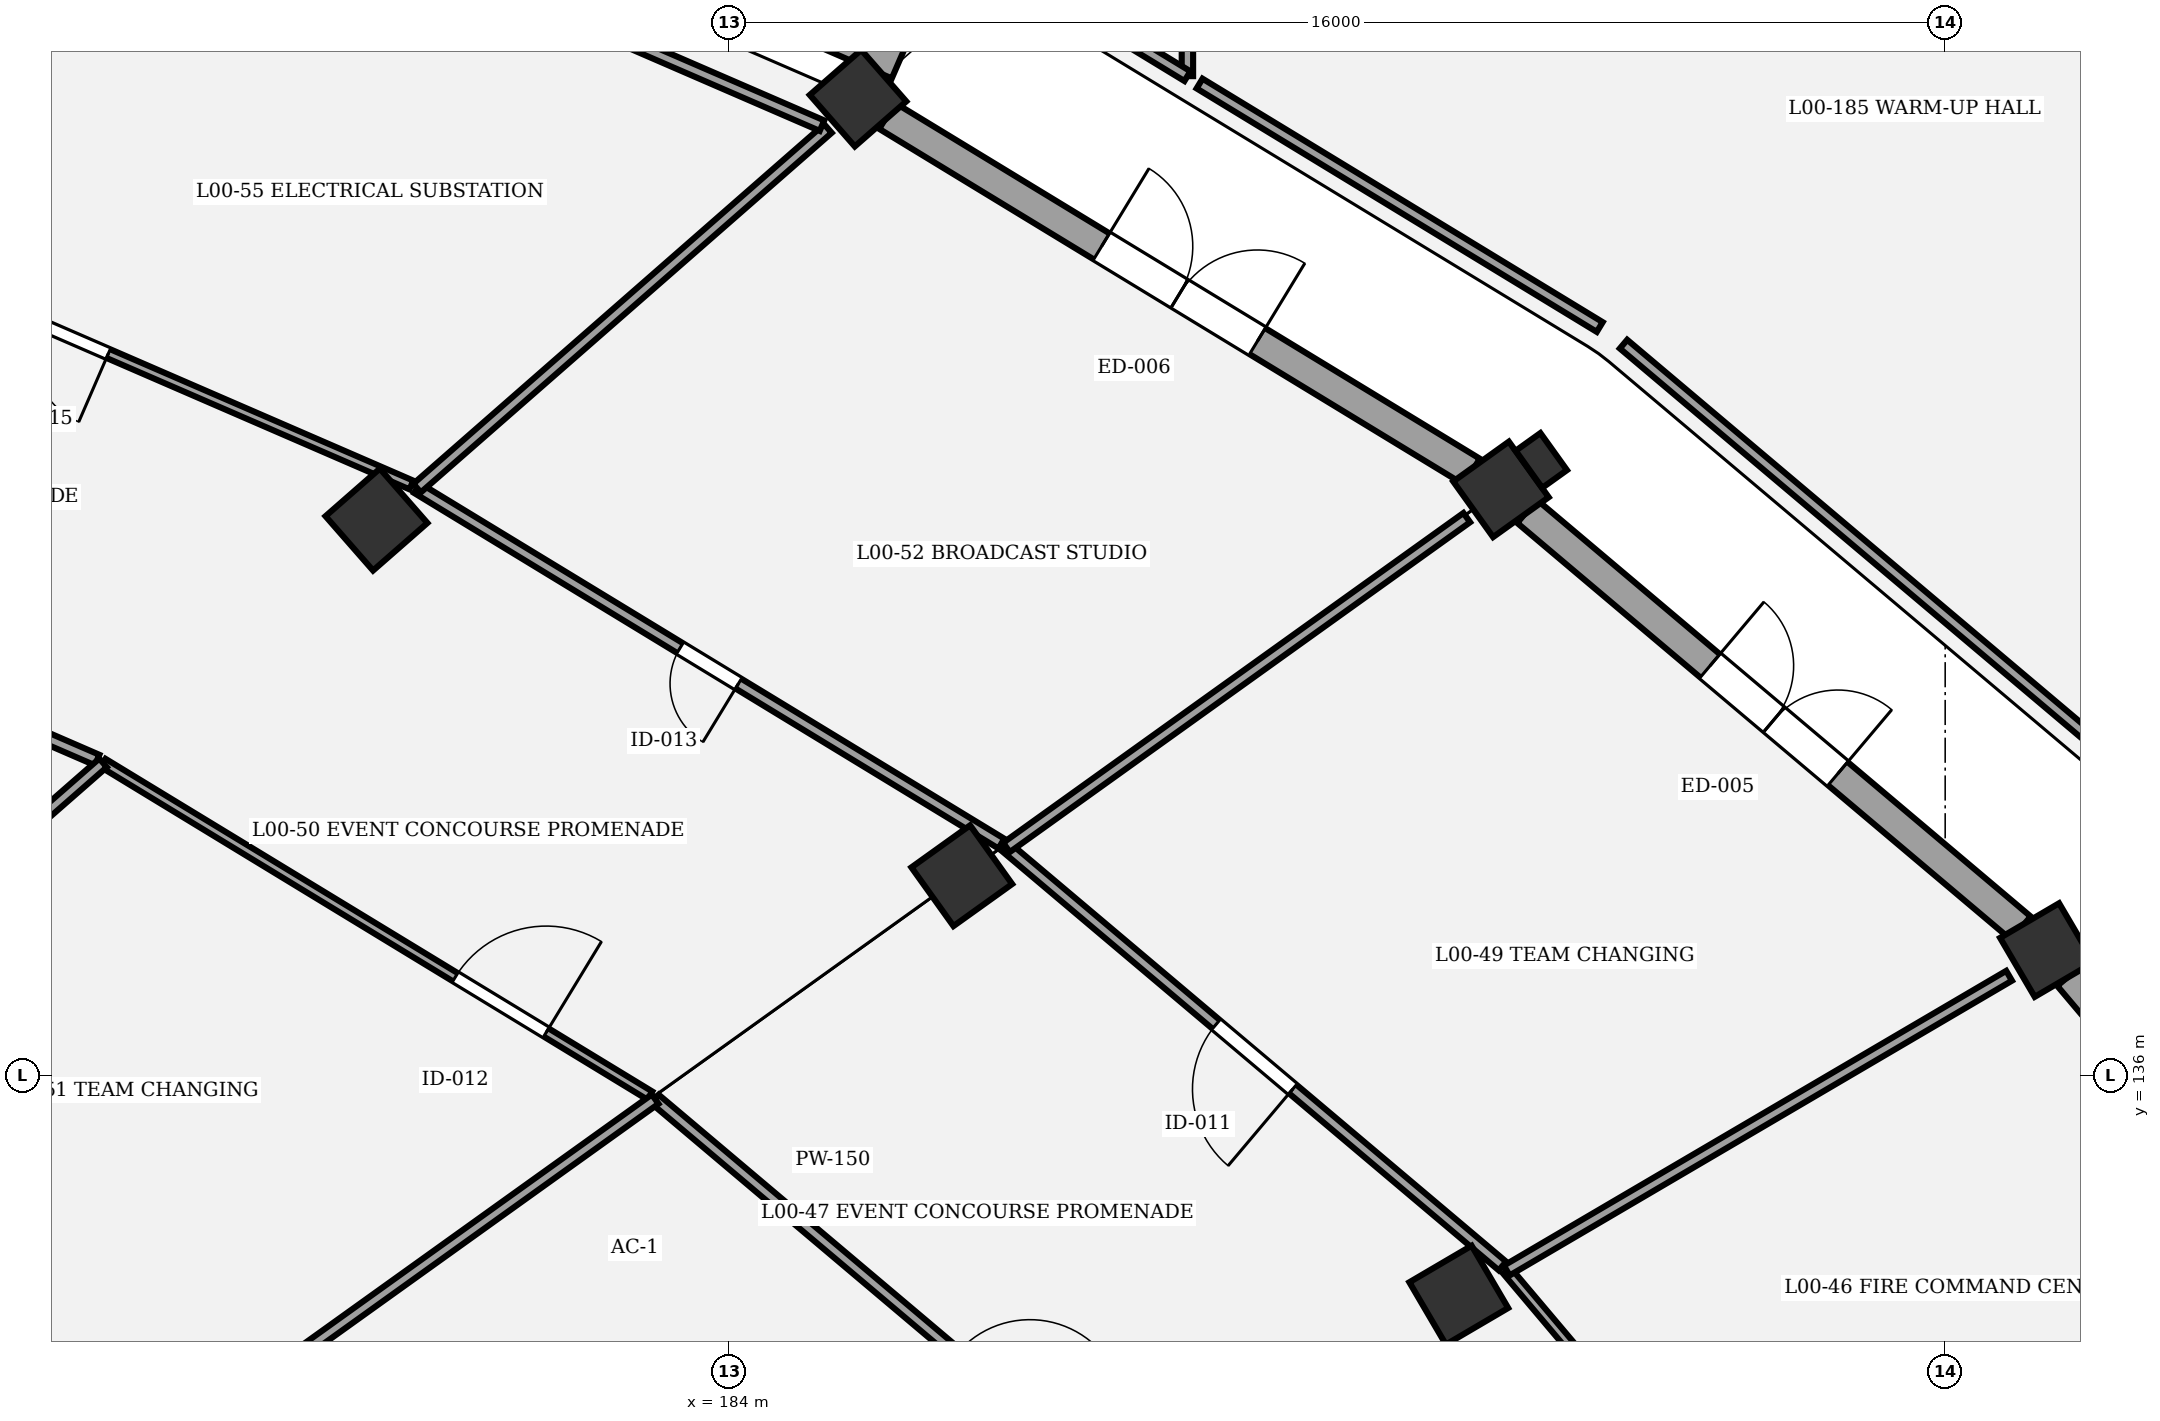
"""IFC4 building model, lengths in metres.
Left out: names, types, materials, properties, quantities, classifications, styles, units other than length and angle.
Written with IfcOpenShell. Run it as: python <this file> out.ifc"""

import sys

from ifc_helpers import new_model, si_unit, direction, frame, frame_2d, origin, origin_2d, place, context, subcontext, project, spatial, rectangle, extrude, element, fill, save


model = new_model("IFC4")
c1 = context("Model", 3, precision=1e-05, world=origin(), true_north=direction((0.0, 1.0)))
c2 = subcontext(c1, "Body", "Model", "MODEL_VIEW")
j1 = project(units=[si_unit("LENGTHUNIT", "METRE"), si_unit("PLANEANGLEUNIT", "RADIAN")], contexts=[c1])
p1 = place(None, origin())
s1 = spatial("IfcSite", under=j1, at=p1, CompositionType="ELEMENT")
p2 = place(p1, origin())
s2 = spatial("IfcBuilding", under=s1, at=p2, CompositionType="ELEMENT")
p3 = place(p2, origin())
s3 = spatial("IfcBuildingStorey", under=s2, at=p3, CompositionType="ELEMENT", Elevation=0.0)
p4 = place(p3, frame((193.6, 133.114, 0.0), z_axis=(0.0, 0.0, 1.0), x_axis=(0.862513669207, 0.506033764121, 0.0)))
e1 = element("IfcColumn", 1, at=p4, inside=s3, PredefinedType="COLUMN", context=c2, shape_type="SweptSolid", body=[
    extrude(rectangle(XDim=0.95, YDim=0.95, at=origin_2d()), origin(), (0.0, 0.0, 1.0), 5.4),
])
p5 = place(p3, frame((201.338, 137.654, 0.0), z_axis=(0.0, 0.0, 1.0), x_axis=(0.862513669207, 0.506033764121, 0.0)))
e2 = element("IfcColumn", 2, at=p5, inside=s3, PredefinedType="COLUMN", context=c2, shape_type="SweptSolid", body=[
    extrude(rectangle(XDim=0.9, YDim=0.9, at=origin_2d()), origin(), (0.0, 0.0, 1.0), 5.4),
])
p6 = place(p3, frame((187.061, 138.632, 0.0), z_axis=(0.0, 0.0, 1.0), x_axis=(0.812897512265, 0.582406760395, 0.0)))
e3 = element("IfcColumn", 3, at=p6, inside=s3, PredefinedType="COLUMN", context=c2, shape_type="SweptSolid", body=[
    extrude(rectangle(XDim=0.95, YDim=0.95, at=origin_2d()), origin(), (0.0, 0.0, 1.0), 5.4),
])
p7 = place(p3, frame((194.156, 143.715, 0.0), z_axis=(0.0, 0.0, 1.0), x_axis=(0.812897512265, 0.582406760395, 0.0)))
e4 = element("IfcColumn", 4, at=p7, inside=s3, PredefinedType="COLUMN", context=c2, shape_type="SweptSolid", body=[
    extrude(rectangle(XDim=0.9, YDim=0.9, at=origin_2d()), origin(), (0.0, 0.0, 1.0), 5.4),
])
p8 = place(p3, frame((194.686, 144.095, 0.0), z_axis=(0.0, 0.0, 1.0), x_axis=(-0.582406760395, 0.812897512265, 0.0)))
e5 = element("IfcColumn", 5, at=p8, inside=s3, PredefinedType="PILASTER", context=c2, shape_type="SweptSolid", body=[
    extrude(rectangle(XDim=0.6, YDim=0.4, at=origin_2d()), origin(), (0.0, 0.0, 1.0), 5.4),
])
p9 = place(p3, frame((179.36, 143.317, 0.0), z_axis=(0.0, 0.0, 1.0), x_axis=(0.752529860433, 0.658558128912, 0.0)))
e6 = element("IfcColumn", 6, at=p9, inside=s3, PredefinedType="COLUMN", context=c2, shape_type="SweptSolid", body=[
    extrude(rectangle(XDim=0.95, YDim=0.95, at=origin_2d()), origin(), (0.0, 0.0, 1.0), 5.4),
])
p10 = place(p3, frame((185.696, 148.861, 0.0), z_axis=(0.0, 0.0, 1.0), x_axis=(0.752529860433, 0.658558128912, 0.0)))
e7 = element("IfcColumn", 7, at=p10, inside=s3, PredefinedType="COLUMN", context=c2, shape_type="SweptSolid", body=[
    extrude(rectangle(XDim=0.9, YDim=0.9, at=origin_2d()), origin(), (0.0, 0.0, 1.0), 5.4),
])
p11 = place(p3, frame((186.23, 149.328, 0.0), z_axis=(0.0, 0.0, 1.0), x_axis=(-0.917502700529, 0.397729549471, 0.0)))
e8 = element("IfcWall", 8, at=p11, inside=s3, PredefinedType="USERDEFINED", context=c2, shape_type="SweptSolid", body=[
    extrude(rectangle(XDim=10.716, YDim=0.45, at=frame_2d((5.358, 0.0))), origin(), (0.0, 0.0, 1.0), 4.25),
])
p12 = place(p3, frame((201.627, 137.311, 0.0), z_axis=(0.0, 0.0, 1.0), x_axis=(0.645194244502, -0.764018577563, 0.0)))
e9 = element("IfcWall", 9, at=p12, inside=s3, PredefinedType="STANDARD", context=c2, shape_type="SweptSolid", body=[
    extrude(rectangle(XDim=8.256, YDim=0.4, at=frame_2d((4.128, 0.0))), origin(), (0.0, 0.0, 1.0), 4.25),
])
p13 = place(p12, frame((3.078, 0.0, 0.0)))
e10 = element("IfcOpeningElement", 10, at=p13, cuts=e9, PredefinedType="OPENING", context=c2, shape_type="SweptSolid", body=[
    extrude(rectangle(XDim=2.1, YDim=2.45, at=frame_2d((1.05, 1.225))), frame((0.0, 0.21, 0.0), z_axis=(0.0, -1.0, 0.0), x_axis=(1.0, 0.0, 0.0)), (0.0, 0.0, 1.0), 0.42),
])
p14 = place(p3, frame((194.498, 143.426, 0.0), z_axis=(0.0, 0.0, 1.0), x_axis=(0.764254773348, -0.644914445035, 0.0)))
e11 = element("IfcWall", 11, at=p14, inside=s3, PredefinedType="STANDARD", context=c2, shape_type="SweptSolid", body=[
    extrude(rectangle(XDim=8.502, YDim=0.4, at=frame_2d((4.251, 0.0))), origin(), (0.0, 0.0, 1.0), 4.25),
])
p15 = place(p14, frame((3.151, 0.0, 0.0)))
e12 = element("IfcOpeningElement", 12, at=p15, cuts=e11, PredefinedType="OPENING", context=c2, shape_type="SweptSolid", body=[
    extrude(rectangle(XDim=2.2, YDim=2.5, at=frame_2d((1.1, 1.25))), frame((0.0, 0.21, 0.0), z_axis=(0.0, -1.0, 0.0), x_axis=(1.0, 0.0, 0.0)), (0.0, 0.0, 1.0), 0.42),
])
p16 = place(p3, frame((186.079, 148.628, 0.0), z_axis=(0.0, 0.0, 1.0), x_axis=(0.854319454423, -0.519748275413, 0.0)))
e13 = element("IfcWall", 13, at=p16, inside=s3, PredefinedType="STANDARD", context=c2, shape_type="SweptSolid", body=[
    extrude(rectangle(XDim=9.006, YDim=0.4, at=frame_2d((4.503, 0.0))), origin(), (0.0, 0.0, 1.0), 4.25),
])
p17 = place(p16, frame((3.303, 0.0, 0.0)))
e14 = element("IfcOpeningElement", 14, at=p17, cuts=e13, PredefinedType="OPENING", context=c2, shape_type="SweptSolid", body=[
    extrude(rectangle(XDim=2.4, YDim=2.55, at=frame_2d((1.2, 1.275))), frame((0.0, 0.21, 0.0), z_axis=(0.0, -1.0, 0.0), x_axis=(1.0, 0.0, 0.0)), (0.0, 0.0, 1.0), 0.42),
])
p18 = place(p3, frame((199.595, 127.086, 0.0), z_axis=(0.0, 0.0, 1.0), x_axis=(-0.64516519871, 0.76404310505, 0.0)))
e15 = element("IfcWall", 15, at=p18, inside=s3, PredefinedType="PARTITIONING", context=c2, shape_type="SweptSolid", body=[
    extrude(rectangle(XDim=8.313, YDim=0.125, at=frame_2d((4.157, 0.0))), origin(), (0.0, 0.0, 1.0), 4.15),
])
p19 = place(p18, frame((3.547, 0.0, 0.0)))
e16 = element("IfcOpeningElement", 16, at=p19, cuts=e15, PredefinedType="OPENING", context=c2, shape_type="SweptSolid", body=[
    extrude(rectangle(XDim=1.22, YDim=2.1, at=frame_2d((0.61, 1.05))), frame((0.0, 0.073, 0.0), z_axis=(0.0, -1.0, 0.0), x_axis=(1.0, 0.0, 0.0)), (0.0, 0.0, 1.0), 0.145),
])
p20 = place(p3, frame((183.027, 135.692, 0.0), z_axis=(0.0, 0.0, 1.0), x_axis=(0.764249122867, -0.644921141068, 0.0)))
e17 = element("IfcWall", 17, at=p20, inside=s3, PredefinedType="PARTITIONING", context=c2, shape_type="SweptSolid", body=[
    extrude(rectangle(XDim=7.99, YDim=0.15, at=frame_2d((3.995, 0.0))), origin(), (0.0, 0.0, 1.0), 4.15),
])
p21 = place(p20, frame((5.192, 0.0, 0.0)))
e18 = element("IfcOpeningElement", 18, at=p21, cuts=e17, PredefinedType="OPENING", context=c2, shape_type="SweptSolid", body=[
    extrude(rectangle(XDim=1.26, YDim=2.1, at=frame_2d((0.63, 1.05))), frame((0.0, 0.085, 0.0), z_axis=(0.0, -1.0, 0.0), x_axis=(1.0, 0.0, 0.0)), (0.0, 0.0, 1.0), 0.17),
])
p22 = place(p3, frame((194.175, 133.497, 0.0), z_axis=(0.0, 0.0, 1.0), x_axis=(-0.764257572309, 0.644911128117, 0.0)))
e19 = element("IfcWall", 19, at=p22, inside=s3, PredefinedType="PARTITIONING", context=c2, shape_type="SweptSolid", body=[
    extrude(rectangle(XDim=8.539, YDim=0.15, at=frame_2d((4.269, 0.0))), origin(), (0.0, 0.0, 1.0), 4.15),
])
p23 = place(p22, frame((3.609, 0.0, 0.0)))
e20 = element("IfcOpeningElement", 20, at=p23, cuts=e19, PredefinedType="OPENING", context=c2, shape_type="SweptSolid", body=[
    extrude(rectangle(XDim=1.32, YDim=2.1, at=frame_2d((0.66, 1.05))), frame((0.0, 0.085, 0.0), z_axis=(0.0, -1.0, 0.0), x_axis=(1.0, 0.0, 0.0)), (0.0, 0.0, 1.0), 0.17),
])
p24 = place(p3, frame((175.763, 140.116, 0.0), z_axis=(0.0, 0.0, 1.0), x_axis=(0.854330104408, -0.519730769439, 0.0)))
e21 = element("IfcWall", 21, at=p24, inside=s3, PredefinedType="PARTITIONING", context=c2, shape_type="SweptSolid", body=[
    extrude(rectangle(XDim=8.42, YDim=0.125, at=frame_2d((4.21, 0.0))), origin(), (0.0, 0.0, 1.0), 4.15),
])
p25 = place(p24, frame((5.424, 0.0, 0.0)))
e22 = element("IfcOpeningElement", 22, at=p25, cuts=e21, PredefinedType="OPENING", context=c2, shape_type="SweptSolid", body=[
    extrude(rectangle(XDim=1.4, YDim=2.1, at=frame_2d((0.7, 1.05))), frame((0.0, 0.073, 0.0), z_axis=(0.0, -1.0, 0.0), x_axis=(1.0, 0.0, 0.0)), (0.0, 0.0, 1.0), 0.145),
])
p26 = place(p3, frame((187.582, 139.054, 0.0), z_axis=(0.0, 0.0, 1.0), x_axis=(-0.854321649351, 0.519744667554, 0.0)))
e23 = element("IfcWall", 23, at=p26, inside=s3, PredefinedType="PARTITIONING", context=c2, shape_type="SweptSolid", body=[
    extrude(rectangle(XDim=8.999, YDim=0.15, at=frame_2d((4.499, 0.0))), origin(), (0.0, 0.0, 1.0), 4.15),
])
p27 = place(p26, frame((4.049, 0.0, 0.0)))
e24 = element("IfcOpeningElement", 24, at=p27, cuts=e23, PredefinedType="OPENING", context=c2, shape_type="SweptSolid", body=[
    extrude(rectangle(XDim=0.9, YDim=2.2, at=frame_2d((0.45, 1.1))), frame((0.0, 0.085, 0.0), z_axis=(0.0, -1.0, 0.0), x_axis=(1.0, 0.0, 0.0)), (0.0, 0.0, 1.0), 0.17),
])
p28 = place(p3, frame((167.382, 143.753, 0.0), z_axis=(0.0, 0.0, 1.0), x_axis=(0.917494590455, -0.397748257677, 0.0)))
e25 = element("IfcWall", 25, at=p28, inside=s3, PredefinedType="PARTITIONING", context=c2, shape_type="SweptSolid", body=[
    extrude(rectangle(XDim=9.049, YDim=0.15, at=frame_2d((4.525, 0.0))), origin(), (0.0, 0.0, 1.0), 4.15),
])
p29 = place(p28, frame((6.295, 0.0, 0.0)))
e26 = element("IfcOpeningElement", 26, at=p29, cuts=e25, PredefinedType="OPENING", context=c2, shape_type="SweptSolid", body=[
    extrude(rectangle(XDim=0.94, YDim=2.2, at=frame_2d((0.47, 1.1))), frame((0.0, 0.085, 0.0), z_axis=(0.0, -1.0, 0.0), x_axis=(1.0, 0.0, 0.0)), (0.0, 0.0, 1.0), 0.17),
])
p30 = place(p3, frame((179.82, 143.772, 0.0), z_axis=(0.0, 0.0, 1.0), x_axis=(-0.917508957037, 0.39771511633, 0.0)))
e27 = element("IfcWall", 27, at=p30, inside=s3, PredefinedType="PARTITIONING", context=c2, shape_type="SweptSolid", body=[
    extrude(rectangle(XDim=9.671, YDim=0.125, at=frame_2d((4.836, 0.0))), origin(), (0.0, 0.0, 1.0), 4.15),
])
p31 = place(p30, frame((4.346, 0.0, 0.0)))
e28 = element("IfcOpeningElement", 28, at=p31, cuts=e27, PredefinedType="OPENING", context=c2, shape_type="SweptSolid", body=[
    extrude(rectangle(XDim=0.98, YDim=2.2, at=frame_2d((0.49, 1.1))), frame((0.0, 0.073, 0.0), z_axis=(0.0, -1.0, 0.0), x_axis=(1.0, 0.0, 0.0)), (0.0, 0.0, 1.0), 0.145),
])
p32 = place(p3, frame((194.232, 133.438, 0.0), z_axis=(0.0, 0.0, 1.0), x_axis=(0.862520085009, 0.506022828492, 0.0)))
e29 = element("IfcWall", 29, at=p32, inside=s3, PredefinedType="PARTITIONING", context=c2, shape_type="SweptSolid", body=[
    extrude(rectangle(XDim=7.663, YDim=0.15, at=frame_2d((3.831, 0.0))), origin(), (0.0, 0.0, 1.0), 4.15),
])
p33 = place(p3, frame((170.698, 126.858, 0.0), z_axis=(0.0, 0.0, 1.0), x_axis=(0.812883175227, 0.582426770876, 0.0)))
e30 = element("IfcWall", 30, at=p33, inside=s3, PredefinedType="PARTITIONING", context=c2, shape_type="SweptSolid", body=[
    extrude(rectangle(XDim=15.167, YDim=0.15, at=frame_2d((7.583, 0.0))), origin(), (0.0, 0.0, 1.0), 4.15),
])
p34 = place(p3, frame((187.649, 139.004, 0.0), z_axis=(0.0, 0.0, 1.0), x_axis=(0.812884613266, 0.582424763824, 0.0)))
e31 = element("IfcWall", 31, at=p34, inside=s3, PredefinedType="PARTITIONING", context=c2, shape_type="SweptSolid", body=[
    extrude(rectangle(XDim=7.45, YDim=0.15, at=frame_2d((3.725, 0.0))), origin(), (0.0, 0.0, 1.0), 4.15),
])
p35 = place(p3, frame((164.755, 130.483, 0.0), z_axis=(0.0, 0.0, 1.0), x_axis=(0.75255911769, 0.658524695346, 0.0)))
e32 = element("IfcWall", 32, at=p35, inside=s3, PredefinedType="PARTITIONING", context=c2, shape_type="SweptSolid", body=[
    extrude(rectangle(XDim=14.627, YDim=0.15, at=frame_2d((7.314, 0.0))), origin(), (0.0, 0.0, 1.0), 4.15),
])
p36 = place(p3, frame((179.895, 143.731, 0.0), z_axis=(0.0, 0.0, 1.0), x_axis=(0.752564061831, 0.658519045162, 0.0)))
e33 = element("IfcWall", 33, at=p36, inside=s3, PredefinedType="PARTITIONING", context=c2, shape_type="SweptSolid", body=[
    extrude(rectangle(XDim=7.183, YDim=0.15, at=frame_2d((3.592, 0.0))), origin(), (0.0, 0.0, 1.0), 4.15),
])
p37 = place(p3, frame((172.286, 149.072, 0.0), z_axis=(0.0, 0.0, 1.0), x_axis=(0.67785928919, 0.735191664846, 0.0)))
e34 = element("IfcWall", 34, at=p37, inside=s3, PredefinedType="PARTITIONING", context=c2, shape_type="SweptSolid", body=[
    extrude(rectangle(XDim=4.893, YDim=0.15, at=frame_2d((2.446, 0.0))), origin(), (0.0, 0.0, 1.0), 4.15),
])
p38 = place(p3, frame((176.189, 152.415, 0.0), z_axis=(0.0, 0.0, 1.0), x_axis=(0.917505556499, -0.397722961109, 0.0)))
e35 = element("IfcWall", 35, at=p38, inside=s3, PredefinedType="PARTITIONING", context=c2, shape_type="SweptSolid", body=[
    extrude(rectangle(XDim=9.845, YDim=0.15, at=frame_2d((4.922, 0.0))), origin(), (0.0, 0.0, 1.0), 4.15),
])
p39 = place(p3, frame((190.03, 155.34, 0.0), z_axis=(0.0, 0.0, 1.0), x_axis=(0.0, -1.0, 0.0)))
e36 = element("IfcWall", 36, at=p39, inside=s3, PredefinedType="PARTITIONING", context=c2, shape_type="SweptSolid", body=[
    extrude(rectangle(XDim=6.189, YDim=0.15, at=frame_2d((3.095, 0.0))), origin(), (0.0, 0.0, 1.0), 4.15),
])
p40 = place(p3, frame((190.03, 149.151, 0.0), z_axis=(0.0, 0.0, 1.0), x_axis=(-0.854335242099, 0.519722324042, 0.0)))
e37 = element("IfcWall", 37, at=p40, inside=s3, PredefinedType="PARTITIONING", context=c2, shape_type="SweptSolid", body=[
    extrude(rectangle(XDim=3.552, YDim=0.15, at=frame_2d((1.776, 0.0))), origin(), (0.0, 0.0, 1.0), 4.15),
])
p41 = place(p3, frame((202.951, 139.564, 0.0), z_axis=(0.0, 0.0, 1.0), x_axis=(-0.76426547638, 0.644901761212, 0.0)))
e38 = element("IfcWall", 38, at=p41, inside=s3, PredefinedType="PARTITIONING", context=c2, shape_type="SweptSolid", body=[
    extrude(rectangle(XDim=9.398, YDim=0.15, at=frame_2d((4.699, 0.0))), origin(), (0.0, 0.0, 1.0), 4.15),
])
p42 = place(p3, frame((195.455, 145.85, 0.0), z_axis=(0.0, 0.0, 1.0), x_axis=(-0.854341575167, 0.519711913411, 0.0)))
e39 = element("IfcWall", 39, at=p42, inside=s3, PredefinedType="PARTITIONING", context=c2, shape_type="SweptSolid", body=[
    extrude(rectangle(XDim=6.163, YDim=0.15, at=frame_2d((3.082, 0.0))), origin(), (0.0, 0.0, 1.0), 4.15),
])
p43 = place(p15, origin())
e40 = element("IfcDoor", 40, at=p43, inside=s3, OperationType="DOUBLE_DOOR_SINGLE_SWING", PredefinedType="DOOR", context=c2, shape_type="SweptSolid", body=[
    extrude(rectangle(XDim=2.2, YDim=2.5, at=frame_2d((1.1, 1.25))), frame((0.0, 0.025, 0.0), z_axis=(0.0, -1.0, 0.0), x_axis=(1.0, 0.0, 0.0)), (0.0, 0.0, 1.0), 0.05),
])
fill(e12, e40)
p44 = place(p17, origin())
e41 = element("IfcDoor", 41, at=p44, inside=s3, OperationType="DOUBLE_DOOR_SINGLE_SWING", PredefinedType="DOOR", context=c2, shape_type="SweptSolid", body=[
    extrude(rectangle(XDim=2.4, YDim=2.55, at=frame_2d((1.2, 1.275))), frame((0.0, 0.025, 0.0), z_axis=(0.0, -1.0, 0.0), x_axis=(1.0, 0.0, 0.0)), (0.0, 0.0, 1.0), 0.05),
])
fill(e14, e41)
p45 = place(p23, origin())
e42 = element("IfcDoor", 42, at=p45, inside=s3, OperationType="SINGLE_SWING_LEFT", PredefinedType="DOOR", context=c2, shape_type="SweptSolid", body=[
    extrude(rectangle(XDim=1.32, YDim=2.1, at=frame_2d((0.66, 1.05))), frame((0.0, 0.025, 0.0), z_axis=(0.0, -1.0, 0.0), x_axis=(1.0, 0.0, 0.0)), (0.0, 0.0, 1.0), 0.05),
])
fill(e20, e42)
p46 = place(p25, origin())
e43 = element("IfcDoor", 43, at=p46, inside=s3, OperationType="SINGLE_SWING_RIGHT", PredefinedType="DOOR", context=c2, shape_type="SweptSolid", body=[
    extrude(rectangle(XDim=1.4, YDim=2.1, at=frame_2d((0.7, 1.05))), frame((0.0, 0.025, 0.0), z_axis=(0.0, -1.0, 0.0), x_axis=(1.0, 0.0, 0.0)), (0.0, 0.0, 1.0), 0.05),
])
fill(e22, e43)
p47 = place(p27, origin())
e44 = element("IfcDoor", 44, at=p47, inside=s3, OperationType="SINGLE_SWING_LEFT", PredefinedType="DOOR", context=c2, shape_type="SweptSolid", body=[
    extrude(rectangle(XDim=0.9, YDim=2.2, at=frame_2d((0.45, 1.1))), frame((0.0, 0.025, 0.0), z_axis=(0.0, -1.0, 0.0), x_axis=(1.0, 0.0, 0.0)), (0.0, 0.0, 1.0), 0.05),
])
fill(e24, e44)
p48 = place(p31, origin())
e45 = element("IfcDoor", 45, at=p48, inside=s3, OperationType="SINGLE_SWING_LEFT", PredefinedType="DOOR", context=c2, shape_type="SweptSolid", body=[
    extrude(rectangle(XDim=0.98, YDim=2.2, at=frame_2d((0.49, 1.1))), frame((0.0, 0.025, 0.0), z_axis=(0.0, -1.0, 0.0), x_axis=(1.0, 0.0, 0.0)), (0.0, 0.0, 1.0), 0.05),
])
fill(e28, e45)
save(model, sys.argv[1])
